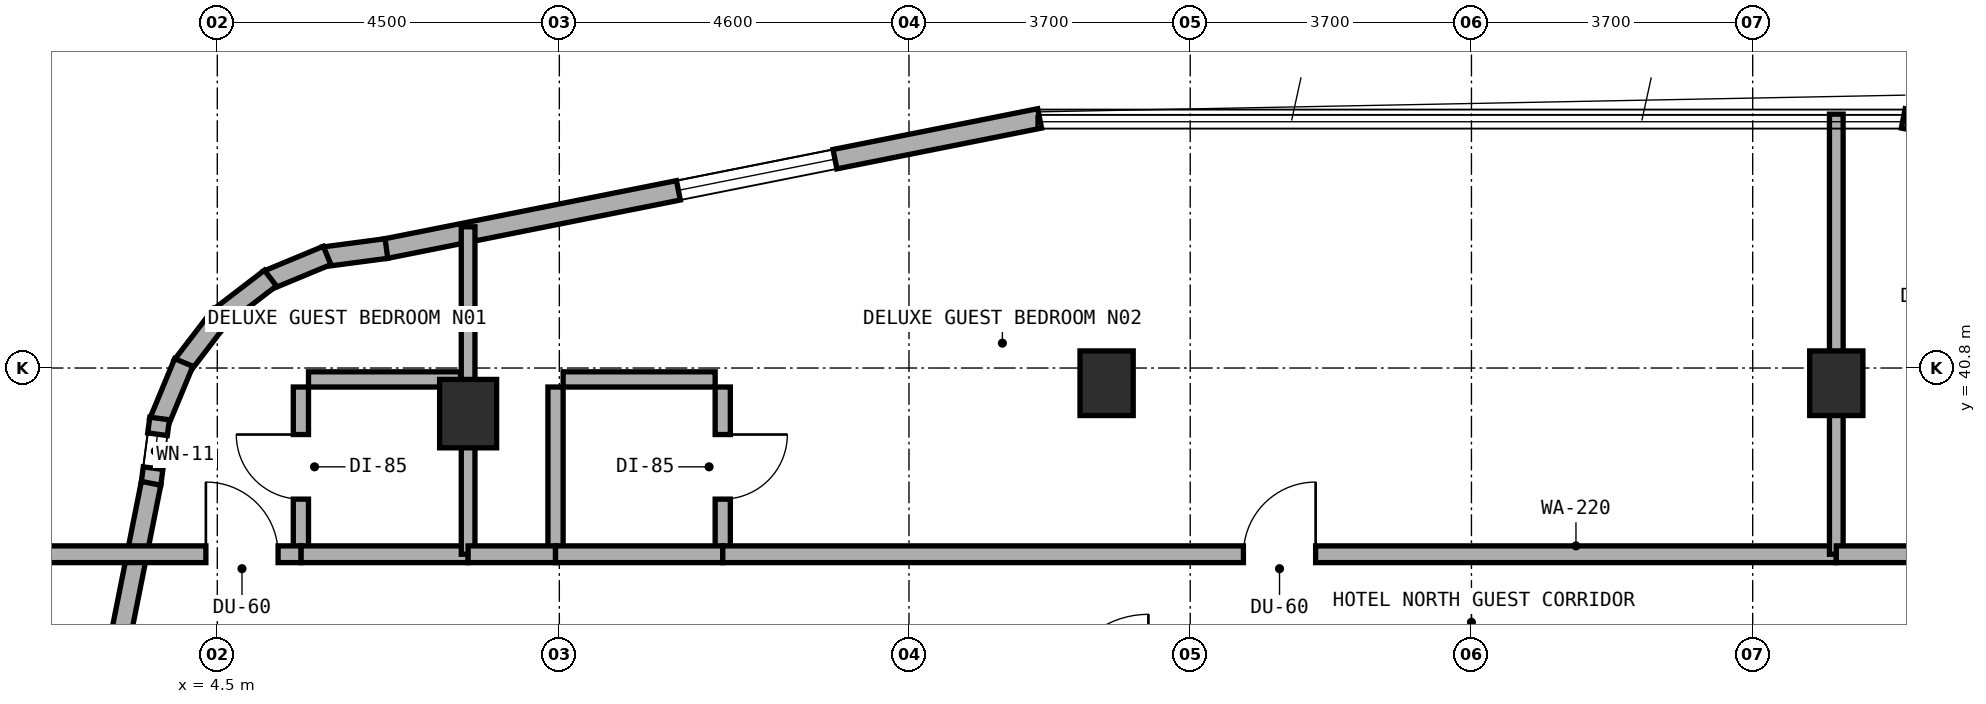
"""IFC4 building model, lengths in metres.
Left out: names, types, materials, properties, quantities, classifications, styles, units other than length and angle.
Written with IfcOpenShell. Run it as: python <this file> out.ifc"""

import sys

from ifc_helpers import new_model, si_unit, direction, frame, frame_2d, origin, origin_2d, place, context, subcontext, project, spatial, rectangle, extrude, element, fill, save


model = new_model("IFC4")
c1 = context("Model", 3, precision=1e-05, world=origin(), true_north=direction((0.0, 1.0)))
c2 = subcontext(c1, "Body", "Model", "MODEL_VIEW")
j1 = project(units=[si_unit("LENGTHUNIT", "METRE"), si_unit("PLANEANGLEUNIT", "RADIAN")], contexts=[c1])
p1 = place(None, origin())
s1 = spatial("IfcSite", under=j1, at=p1, CompositionType="ELEMENT")
p2 = place(p1, origin())
s2 = spatial("IfcBuilding", under=s1, at=p2, CompositionType="ELEMENT")
p3 = place(p2, frame((0.0, 0.0, 202.7)))
s3 = spatial("IfcBuildingStorey", under=s2, at=p3, CompositionType="ELEMENT", Elevation=202.7)
for number, where, z_axis, x_axis in (
    (1, (16.2, 40.6, 0.0), (0.0, 0.0, 1.0), (1.0, 0.0, 0.0)),
    (2, (25.8, 40.6, 0.0), (0.0, 0.0, 1.0), (1.0, 0.0, 0.0)),
):
    element("IfcColumn", number, at=place(p3, frame(where, z_axis=z_axis, x_axis=x_axis)), inside=s3, PredefinedType="COLUMN", context=c2, shape_type="SweptSolid", body=[
        extrude(rectangle(XDim=0.7, YDim=0.85, at=origin_2d()), origin(), (0.0, 0.0, 1.0), 3.6),
    ])
p4 = place(p3, frame((7.8, 40.2, 0.0), z_axis=(0.0, 0.0, 1.0), x_axis=(1.0, 0.0, 0.0)))
e3 = element("IfcColumn", 3, at=p4, inside=s3, PredefinedType="COLUMN", context=c2, shape_type="SweptSolid", body=[
    extrude(rectangle(XDim=0.75, YDim=0.9, at=origin_2d()), origin(), (0.0, 0.0, 1.0), 3.6),
])
p5 = place(p3, frame((35.283, 42.371, 0.0), z_axis=(0.0, 0.0, 1.0), x_axis=(-0.980745199176, 0.195291715883, 0.0)))
e4 = element("IfcWall", 4, at=p5, inside=s3, PredefinedType="STANDARD", context=c2, shape_type="SweptSolid", body=[
    extrude(rectangle(XDim=8.771, YDim=0.26, at=frame_2d((4.385, 0.0))), origin(), (0.0, 0.0, 1.0), 3.32),
])
p6 = place(p5, frame((3.925, 0.0, 0.85)))
e5 = element("IfcOpeningElement", 5, at=p6, cuts=e4, PredefinedType="OPENING", context=c2, shape_type="SweptSolid", body=[
    extrude(rectangle(XDim=2.1, YDim=1.5, at=frame_2d((1.05, 0.75))), frame((0.0, 0.14, 0.0), z_axis=(0.0, -1.0, 0.0), x_axis=(1.0, 0.0, 0.0)), (0.0, 0.0, 1.0), 0.28),
])
p7 = place(p3, frame((15.319, 44.084, 0.0), z_axis=(0.0, 0.0, 1.0), x_axis=(-0.980745199176, -0.195291715883, 0.0)))
e6 = element("IfcWall", 6, at=p7, inside=s3, PredefinedType="STANDARD", context=c2, shape_type="SweptSolid", body=[
    extrude(rectangle(XDim=8.771, YDim=0.26, at=frame_2d((4.385, 0.0))), origin(), (0.0, 0.0, 1.0), 3.32),
])
p8 = place(p7, frame((2.746, 0.0, 0.85)))
e7 = element("IfcOpeningElement", 7, at=p8, cuts=e6, PredefinedType="OPENING", context=c2, shape_type="SweptSolid", body=[
    extrude(rectangle(XDim=2.1, YDim=1.5, at=frame_2d((1.05, 0.75))), frame((0.0, 0.14, 0.0), z_axis=(0.0, -1.0, 0.0), x_axis=(1.0, 0.0, 0.0)), (0.0, 0.0, 1.0), 0.28),
])
p9 = place(p3, frame((6.725, 42.372, 0.0), z_axis=(0.0, 0.0, 1.0), x_axis=(-0.9913883573, -0.130954667764, 0.0)))
e8 = element("IfcWall", 8, at=p9, inside=s3, PredefinedType="STANDARD", context=c2, shape_type="SweptSolid", body=[
    extrude(rectangle(XDim=0.833, YDim=0.26, at=frame_2d((0.417, 0.0))), origin(), (0.0, 0.0, 1.0), 3.32),
])
p10 = place(p3, frame((5.945, 42.281, 0.0), z_axis=(0.0, 0.0, 1.0), x_axis=(-0.923754491172, -0.382985169477, 0.0)))
e9 = element("IfcWall", 9, at=p10, inside=s3, PredefinedType="STANDARD", context=c2, shape_type="SweptSolid", body=[
    extrude(rectangle(XDim=0.851, YDim=0.26, at=frame_2d((0.426, 0.0))), origin(), (0.0, 0.0, 1.0), 3.32),
])
for number, where, z_axis, x_axis in (
    (10, (5.199, 41.983, 0.0), (0.0, 0.0, 1.0), (-0.794, -0.608, 0.0)),
    (11, (4.555, 41.504, 0.0), (0.0, 0.0, 1.0), (-0.608, -0.794, 0.0)),
):
    element("IfcWall", number, at=place(p3, frame(where, z_axis=z_axis, x_axis=x_axis)), inside=s3, PredefinedType="STANDARD", context=c2, shape_type="SweptSolid", body=[
        extrude(rectangle(XDim=0.85, YDim=0.26, at=frame_2d((0.425, 0.0))), origin(), (0.0, 0.0, 1.0), 3.32),
    ])
p11 = place(p3, frame((4.059, 40.873, 0.0), z_axis=(0.0, 0.0, 1.0), x_axis=(-0.383229930484, -0.923652976167, 0.0)))
e12 = element("IfcWall", 12, at=p11, inside=s3, PredefinedType="STANDARD", context=c2, shape_type="SweptSolid", body=[
    extrude(rectangle(XDim=0.851, YDim=0.26, at=frame_2d((0.426, 0.0))), origin(), (0.0, 0.0, 1.0), 3.32),
])
p12 = place(p3, frame((3.741, 40.136, 0.0), z_axis=(0.0, 0.0, 1.0), x_axis=(-0.130156359936, -0.991493480548, 0.0)))
e13 = element("IfcWall", 13, at=p12, inside=s3, PredefinedType="STANDARD", context=c2, shape_type="SweptSolid", body=[
    extrude(rectangle(XDim=0.868, YDim=0.26, at=frame_2d((0.434, 0.0))), origin(), (0.0, 0.0, 1.0), 3.32),
])
p13 = place(p12, frame((0.209, 0.0, 0.85)))
e14 = element("IfcOpeningElement", 14, at=p13, cuts=e13, PredefinedType="OPENING", context=c2, shape_type="SweptSolid", body=[
    extrude(rectangle(XDim=0.45, YDim=1.5, at=frame_2d((0.225, 0.75))), frame((0.0, 0.14, 0.0), z_axis=(0.0, -1.0, 0.0), x_axis=(1.0, 0.0, 0.0)), (0.0, 0.0, 1.0), 0.28),
])
p14 = place(p3, frame((3.629, 39.283, 0.0), z_axis=(0.0, 0.0, 1.0), x_axis=(-0.195291715883, -0.980745199176, 0.0)))
e15 = element("IfcWall", 15, at=p14, inside=s3, PredefinedType="STANDARD", context=c2, shape_type="SweptSolid", body=[
    extrude(rectangle(XDim=8.771, YDim=0.26, at=frame_2d((4.385, 0.0))), origin(), (0.0, 0.0, 1.0), 3.32),
])
p15 = place(p14, frame((3.873, 0.0, 0.85)))
e16 = element("IfcOpeningElement", 16, at=p15, cuts=e15, PredefinedType="OPENING", context=c2, shape_type="SweptSolid", body=[
    extrude(rectangle(XDim=2.1, YDim=1.5, at=frame_2d((1.05, 0.75))), frame((0.0, 0.14, 0.0), z_axis=(0.0, -1.0, 0.0), x_axis=(1.0, 0.0, 0.0)), (0.0, 0.0, 1.0), 0.28),
])
p16 = place(p3, frame((5.6, 38.45, 0.0), z_axis=(0.0, 0.0, 1.0), x_axis=(0.0, 1.0, 0.0)))
e17 = element("IfcWall", 17, at=p16, inside=s3, PredefinedType="PLUMBINGWALL", context=c2, shape_type="SweptSolid", body=[
    extrude(rectangle(XDim=2.1, YDim=0.2, at=frame_2d((1.05, 0.0))), origin(), (0.0, 0.0, 1.0), 3.32),
])
p17 = place(p16, frame((0.625, 0.0, 0.0)))
e18 = element("IfcOpeningElement", 18, at=p17, cuts=e17, PredefinedType="OPENING", context=c2, shape_type="SweptSolid", body=[
    extrude(rectangle(XDim=0.85, YDim=2.1, at=frame_2d((0.425, 1.05))), frame((0.0, 0.11, 0.0), z_axis=(0.0, -1.0, 0.0), x_axis=(1.0, 0.0, 0.0)), (0.0, 0.0, 1.0), 0.22),
])
p18 = place(p3, frame((5.7, 40.65, 0.0), z_axis=(0.0, 0.0, 1.0), x_axis=(1.0, 0.0, 0.0)))
e19 = element("IfcWall", 19, at=p18, inside=s3, PredefinedType="PLUMBINGWALL", context=c2, shape_type="SweptSolid", body=[
    extrude(rectangle(XDim=2.0, YDim=0.2, at=frame_2d((1.0, 0.0))), origin(), (0.0, 0.0, 1.0), 3.32),
])
p19 = place(p3, frame((5.6, 38.35, 0.0), z_axis=(0.0, 0.0, 1.0), x_axis=(1.0, 0.0, 0.0)))
e20 = element("IfcWall", 20, at=p19, inside=s3, PredefinedType="SOLIDWALL", context=c2, shape_type="SweptSolid", body=[
    extrude(rectangle(XDim=2.2, YDim=0.22, at=frame_2d((1.1, 0.0))), origin(), (0.0, 0.0, 1.0), 2.695),
])
p20 = place(p3, frame((1.96, 38.35, 0.0), z_axis=(0.0, 0.0, 1.0), x_axis=(1.0, 0.0, 0.0)))
e21 = element("IfcWall", 21, at=p20, inside=s3, PredefinedType="SOLIDWALL", context=c2, shape_type="SweptSolid", body=[
    extrude(rectangle(XDim=3.64, YDim=0.22, at=frame_2d((1.82, 0.0))), origin(), (0.0, 0.0, 1.0), 3.32),
])
p21 = place(p20, frame((2.39, 0.0, 0.0)))
e22 = element("IfcOpeningElement", 22, at=p21, cuts=e21, PredefinedType="OPENING", context=c2, shape_type="SweptSolid", body=[
    extrude(rectangle(XDim=0.95, YDim=2.1, at=frame_2d((0.475, 1.05))), frame((0.0, 0.12, 0.0), z_axis=(0.0, -1.0, 0.0), x_axis=(1.0, 0.0, 0.0)), (0.0, 0.0, 1.0), 0.24),
])
p22 = place(p3, frame((7.8, 38.35, 0.0), z_axis=(0.0, 0.0, 1.0), x_axis=(0.0, 1.0, 0.0)))
e23 = element("IfcWall", 23, at=p22, inside=s3, PredefinedType="SOLIDWALL", context=c2, shape_type="SweptSolid", body=[
    extrude(rectangle(XDim=4.308, YDim=0.18, at=frame_2d((2.154, 0.0))), origin(), (0.0, 0.0, 1.0), 2.695),
])
p23 = place(p3, frame((11.15, 38.45, 0.0), z_axis=(0.0, 0.0, 1.0), x_axis=(0.0, 1.0, 0.0)))
e24 = element("IfcWall", 24, at=p23, inside=s3, PredefinedType="PLUMBINGWALL", context=c2, shape_type="SweptSolid", body=[
    extrude(rectangle(XDim=2.1, YDim=0.2, at=frame_2d((1.05, 0.0))), origin(), (0.0, 0.0, 1.0), 2.845),
])
p24 = place(p23, frame((0.625, 0.0, 0.0)))
e25 = element("IfcOpeningElement", 25, at=p24, cuts=e24, PredefinedType="OPENING", context=c2, shape_type="SweptSolid", body=[
    extrude(rectangle(XDim=0.85, YDim=2.1, at=frame_2d((0.425, 1.05))), frame((0.0, 0.11, 0.0), z_axis=(0.0, -1.0, 0.0), x_axis=(1.0, 0.0, 0.0)), (0.0, 0.0, 1.0), 0.22),
])
p25 = place(p3, frame((9.05, 40.65, 0.0), z_axis=(0.0, 0.0, 1.0), x_axis=(1.0, 0.0, 0.0)))
e26 = element("IfcWall", 26, at=p25, inside=s3, PredefinedType="PLUMBINGWALL", context=c2, shape_type="SweptSolid", body=[
    extrude(rectangle(XDim=2.0, YDim=0.2, at=frame_2d((1.0, 0.0))), origin(), (0.0, 0.0, 1.0), 3.32),
])
p26 = place(p3, frame((8.95, 38.45, 0.0), z_axis=(0.0, 0.0, 1.0), x_axis=(0.0, 1.0, 0.0)))
e27 = element("IfcWall", 27, at=p26, inside=s3, PredefinedType="PLUMBINGWALL", context=c2, shape_type="SweptSolid", body=[
    extrude(rectangle(XDim=2.1, YDim=0.2, at=frame_2d((1.05, 0.0))), origin(), (0.0, 0.0, 1.0), 2.845),
])
p27 = place(p3, frame((7.8, 38.35, 0.0), z_axis=(0.0, 0.0, 1.0), x_axis=(1.0, 0.0, 0.0)))
e28 = element("IfcWall", 28, at=p27, inside=s3, PredefinedType="SOLIDWALL", context=c2, shape_type="SweptSolid", body=[
    extrude(rectangle(XDim=1.15, YDim=0.22, at=frame_2d((0.575, 0.0))), origin(), (0.0, 0.0, 1.0), 2.695),
])
p28 = place(p3, frame((8.95, 38.35, 0.0), z_axis=(0.0, 0.0, 1.0), x_axis=(1.0, 0.0, 0.0)))
e29 = element("IfcWall", 29, at=p28, inside=s3, PredefinedType="SOLIDWALL", context=c2, shape_type="SweptSolid", body=[
    extrude(rectangle(XDim=2.2, YDim=0.22, at=frame_2d((1.1, 0.0))), origin(), (0.0, 0.0, 1.0), 3.32),
])
p29 = place(p3, frame((11.15, 38.35, 0.0), z_axis=(0.0, 0.0, 1.0), x_axis=(1.0, 0.0, 0.0)))
e30 = element("IfcWall", 30, at=p29, inside=s3, PredefinedType="SOLIDWALL", context=c2, shape_type="SweptSolid", body=[
    extrude(rectangle(XDim=14.65, YDim=0.22, at=frame_2d((7.325, 0.0))), origin(), (0.0, 0.0, 1.0), 2.695),
])
p30 = place(p29, frame((6.85, 0.0, 0.0)))
e31 = element("IfcOpeningElement", 31, at=p30, cuts=e30, PredefinedType="OPENING", context=c2, shape_type="SweptSolid", body=[
    extrude(rectangle(XDim=0.95, YDim=2.1, at=frame_2d((0.475, 1.05))), frame((0.0, 0.12, 0.0), z_axis=(0.0, -1.0, 0.0), x_axis=(1.0, 0.0, 0.0)), (0.0, 0.0, 1.0), 0.24),
])
p31 = place(p3, frame((25.8, 38.35, 0.0), z_axis=(0.0, 0.0, 1.0), x_axis=(0.0, 1.0, 0.0)))
e32 = element("IfcWall", 32, at=p31, inside=s3, PredefinedType="SOLIDWALL", context=c2, shape_type="SweptSolid", body=[
    extrude(rectangle(XDim=5.79, YDim=0.18, at=frame_2d((2.895, 0.0))), origin(), (0.0, 0.0, 1.0), 2.695),
])
p32 = place(p3, frame((25.8, 38.35, 0.0), z_axis=(0.0, 0.0, 1.0), x_axis=(1.0, 0.0, 0.0)))
e33 = element("IfcWall", 33, at=p32, inside=s3, PredefinedType="SOLIDWALL", context=c2, shape_type="SweptSolid", body=[
    extrude(rectangle(XDim=5.05, YDim=0.22, at=frame_2d((2.525, 0.0))), origin(), (0.0, 0.0, 1.0), 2.695),
])
p33 = place(p32, frame((2.05, 0.0, 0.0)))
e34 = element("IfcOpeningElement", 34, at=p33, cuts=e33, PredefinedType="OPENING", context=c2, shape_type="SweptSolid", body=[
    extrude(rectangle(XDim=0.95, YDim=2.1, at=frame_2d((0.475, 1.05))), frame((0.0, 0.12, 0.0), z_axis=(0.0, -1.0, 0.0), x_axis=(1.0, 0.0, 0.0)), (0.0, 0.0, 1.0), 0.24),
])
p34 = place(p8, origin())
e35 = element("IfcWindow", 35, at=p34, inside=s3, PartitioningType="SINGLE_PANEL", PredefinedType="WINDOW", context=c2, shape_type="SweptSolid", body=[
    extrude(rectangle(XDim=2.1, YDim=1.5, at=frame_2d((1.05, 0.75))), frame((0.0, 0.03, 0.0), z_axis=(0.0, -1.0, 0.0), x_axis=(1.0, 0.0, 0.0)), (0.0, 0.0, 1.0), 0.06),
])
fill(e7, e35)
p35 = place(p13, origin())
e36 = element("IfcWindow", 36, at=p35, inside=s3, PartitioningType="SINGLE_PANEL", PredefinedType="WINDOW", context=c2, shape_type="SweptSolid", body=[
    extrude(rectangle(XDim=0.45, YDim=1.5, at=frame_2d((0.225, 0.75))), frame((0.0, 0.03, 0.0), z_axis=(0.0, -1.0, 0.0), x_axis=(1.0, 0.0, 0.0)), (0.0, 0.0, 1.0), 0.06),
])
fill(e14, e36)
p36 = place(p17, origin())
e37 = element("IfcDoor", 37, at=p36, inside=s3, OperationType="SINGLE_SWING_RIGHT", PredefinedType="DOOR", context=c2, shape_type="SweptSolid", body=[
    extrude(rectangle(XDim=0.85, YDim=2.1, at=frame_2d((0.425, 1.05))), frame((0.0, 0.025, 0.0), z_axis=(0.0, -1.0, 0.0), x_axis=(1.0, 0.0, 0.0)), (0.0, 0.0, 1.0), 0.05),
])
fill(e18, e37)
p37 = place(p21, origin())
e38 = element("IfcDoor", 38, at=p37, inside=s3, OperationType="SINGLE_SWING_LEFT", PredefinedType="DOOR", context=c2, shape_type="SweptSolid", body=[
    extrude(rectangle(XDim=0.95, YDim=2.1, at=frame_2d((0.475, 1.05))), frame((0.0, 0.025, 0.0), z_axis=(0.0, -1.0, 0.0), x_axis=(1.0, 0.0, 0.0)), (0.0, 0.0, 1.0), 0.05),
])
fill(e22, e38)
p38 = place(p24, frame((0.85, 0.0, 0.0), z_axis=(0.0, 0.0, 1.0), x_axis=(-1.0, 0.0, 0.0)))
e39 = element("IfcDoor", 39, at=p38, inside=s3, OperationType="SINGLE_SWING_LEFT", PredefinedType="DOOR", context=c2, shape_type="SweptSolid", body=[
    extrude(rectangle(XDim=0.85, YDim=2.1, at=frame_2d((0.425, 1.05))), frame((0.0, 0.025, 0.0), z_axis=(0.0, -1.0, 0.0), x_axis=(1.0, 0.0, 0.0)), (0.0, 0.0, 1.0), 0.05),
])
fill(e25, e39)
p39 = place(p30, origin())
e40 = element("IfcDoor", 40, at=p39, inside=s3, OperationType="SINGLE_SWING_RIGHT", PredefinedType="DOOR", context=c2, shape_type="SweptSolid", body=[
    extrude(rectangle(XDim=0.95, YDim=2.1, at=frame_2d((0.475, 1.05))), frame((0.0, 0.025, 0.0), z_axis=(0.0, -1.0, 0.0), x_axis=(1.0, 0.0, 0.0)), (0.0, 0.0, 1.0), 0.05),
])
fill(e31, e40)
save(model, sys.argv[1])
